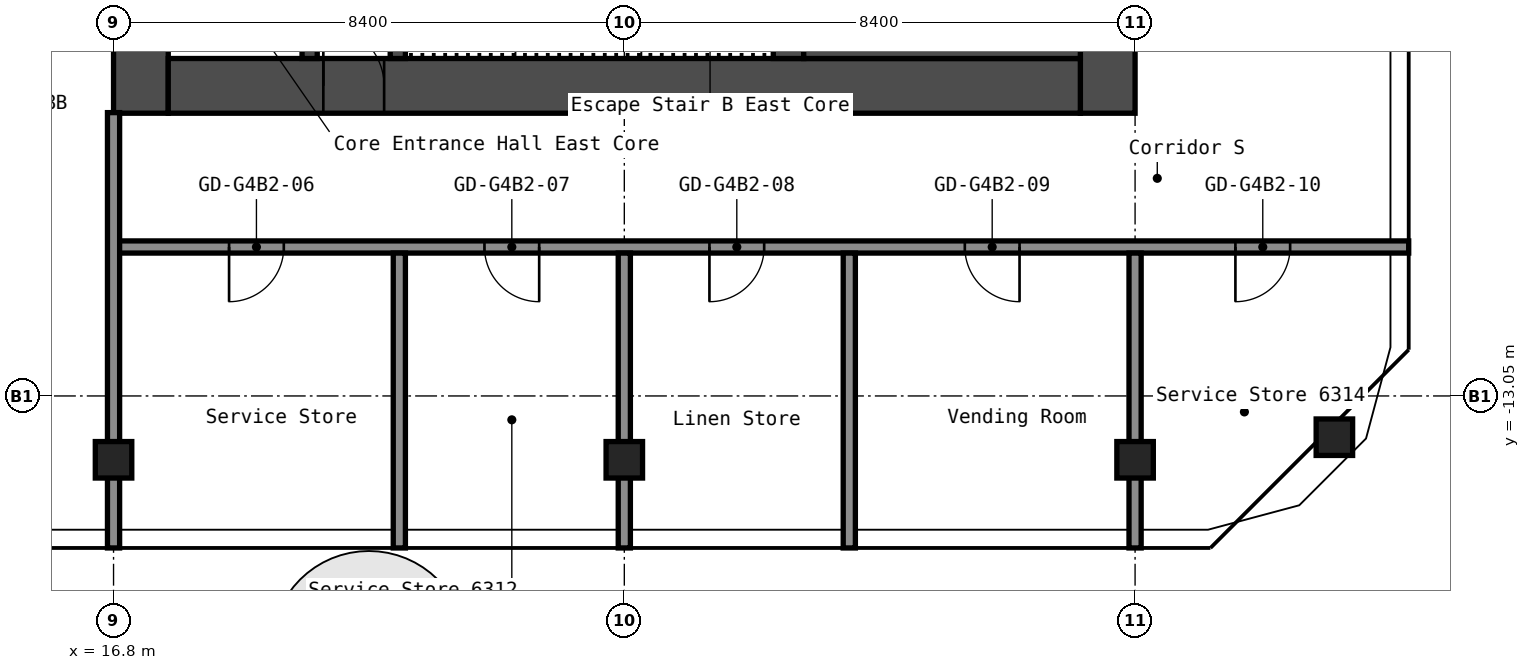
"""IFC4 building model, lengths in metres.
Left out: names, types, materials, properties, quantities, classifications, styles, units other than length and angle.
Written with IfcOpenShell. Run it as: python <this file> out.ifc"""

import sys

from ifc_helpers import new_model, si_unit, direction, frame, frame_2d, origin, origin_2d, place, context, subcontext, project, spatial, rectangle, hollow_rectangle, extrude, element, fill, save


model = new_model("IFC4")
c1 = context("Model", 3, precision=1e-05, world=origin(), true_north=direction((0.0, 1.0)))
c2 = subcontext(c1, "Body", "Model", "MODEL_VIEW")
j1 = project(units=[si_unit("LENGTHUNIT", "METRE"), si_unit("PLANEANGLEUNIT", "RADIAN")], contexts=[c1])
p1 = place(None, origin())
s1 = spatial("IfcSite", under=j1, at=p1, CompositionType="ELEMENT")
p2 = place(p1, origin())
s2 = spatial("IfcBuilding", under=s1, at=p2, CompositionType="ELEMENT")
p3 = place(p2, frame((0.0, 0.0, 221.8)))
s3 = spatial("IfcBuildingStorey", under=s2, at=p3, CompositionType="ELEMENT", Elevation=221.8)
for number, where, z_axis, x_axis in (
    (1, (16.8, -14.1, 0.0), (0.0, 0.0, 1.0), (1.0, 0.0, 0.0)),
    (2, (25.2, -14.1, 0.0), (0.0, 0.0, 1.0), (1.0, 0.0, 0.0)),
    (3, (33.6, -14.1, 0.0), (0.0, 0.0, 1.0), (1.0, 0.0, 0.0)),
    (4, (36.878, -13.729, 0.0), (0.0, 0.0, 1.0), (1.0, 0.0, 0.0)),
):
    element("IfcColumn", number, at=place(p3, frame(where, z_axis=z_axis, x_axis=x_axis)), inside=s3, PredefinedType="COLUMN", context=c2, shape_type="SweptSolid", body=[
        extrude(hollow_rectangle(XDim=0.6, YDim=0.6, WallThickness=0.025, InnerFilletRadius=0.038, OuterFilletRadius=0.062, at=origin_2d()), origin(), (0.0, 0.0, 1.0), 2.75),
    ])
p4 = place(p3, frame((17.25, -8.4, 0.0), z_axis=(0.0, 0.0, 1.0), x_axis=(0.0, 1.0, 0.0)))
e5 = element("IfcWall", 5, at=p4, inside=s3, PredefinedType="SHEAR", context=c2, shape_type="SweptSolid", body=[
    extrude(rectangle(XDim=16.8, YDim=0.9, at=frame_2d((8.4, 0.0))), origin(), (0.0, 0.0, 1.0), 2.75),
])
p5 = place(p4, frame((10.1, 0.0, 0.0)))
e6 = element("IfcOpeningElement", 6, at=p5, cuts=e5, PredefinedType="OPENING", context=c2, shape_type="SweptSolid", body=[
    extrude(rectangle(XDim=1.6, YDim=2.1, at=frame_2d((0.8, 1.05))), frame((0.0, 0.46, 0.0), z_axis=(0.0, -1.0, 0.0), x_axis=(1.0, 0.0, 0.0)), (0.0, 0.0, 1.0), 0.92),
])
p6 = place(p3, frame((33.15, -8.4, 0.0), z_axis=(0.0, 0.0, 1.0), x_axis=(0.0, 1.0, 0.0)))
e7 = element("IfcWall", 7, at=p6, inside=s3, PredefinedType="SHEAR", context=c2, shape_type="SweptSolid", body=[
    extrude(rectangle(XDim=16.8, YDim=0.9, at=frame_2d((8.4, 0.0))), origin(), (0.0, 0.0, 1.0), 2.75),
])
p7 = place(p3, frame((17.7, -7.95, 0.0), z_axis=(0.0, 0.0, 1.0), x_axis=(1.0, 0.0, 0.0)))
e8 = element("IfcWall", 8, at=p7, inside=s3, PredefinedType="SHEAR", context=c2, shape_type="SweptSolid", body=[
    extrude(rectangle(XDim=15.0, YDim=0.9, at=frame_2d((7.5, 0.0))), origin(), (0.0, 0.0, 1.0), 2.75),
])
p8 = place(p7, frame((2.55, 0.0, 0.0)))
e9 = element("IfcOpeningElement", 9, at=p8, cuts=e8, PredefinedType="OPENING", context=c2, shape_type="SweptSolid", body=[
    extrude(rectangle(XDim=1.0, YDim=2.1, at=frame_2d((0.5, 1.05))), frame((0.0, 0.46, 0.0), z_axis=(0.0, -1.0, 0.0), x_axis=(1.0, 0.0, 0.0)), (0.0, 0.0, 1.0), 0.92),
])
p9 = place(p3, frame((20.025, -7.5, 0.0), z_axis=(0.0, 0.0, 1.0), x_axis=(0.0, 1.0, 0.0)))
e10 = element("IfcWall", 10, at=p9, inside=s3, PredefinedType="SHEAR", context=c2, shape_type="SweptSolid", body=[
    extrude(rectangle(XDim=6.3, YDim=0.25, at=frame_2d((3.15, 0.0))), origin(), (0.0, 0.0, 1.0), 2.75),
])
p10 = place(p9, frame((2.4, 0.0, 0.0)))
e11 = element("IfcOpeningElement", 11, at=p10, cuts=e10, PredefinedType="OPENING", context=c2, shape_type="SweptSolid", body=[
    extrude(rectangle(XDim=1.0, YDim=2.1, at=frame_2d((0.5, 1.05))), frame((0.0, 0.135, 0.0), z_axis=(0.0, -1.0, 0.0), x_axis=(1.0, 0.0, 0.0)), (0.0, 0.0, 1.0), 0.27),
])
p11 = place(p3, frame((21.475, -7.5, 0.0), z_axis=(0.0, 0.0, 1.0), x_axis=(0.0, 1.0, 0.0)))
e12 = element("IfcWall", 12, at=p11, inside=s3, PredefinedType="SHEAR", context=c2, shape_type="SweptSolid", body=[
    extrude(rectangle(XDim=3.75, YDim=0.25, at=frame_2d((1.875, 0.0))), origin(), (0.0, 0.0, 1.0), 2.75),
])
p12 = place(p11, frame((1.3, 0.0, 0.0)))
e13 = element("IfcOpeningElement", 13, at=p12, cuts=e12, PredefinedType="OPENING", context=c2, shape_type="SweptSolid", body=[
    extrude(rectangle(XDim=1.2, YDim=2.1, at=frame_2d((0.6, 1.05))), frame((0.0, 0.135, 0.0), z_axis=(0.0, -1.0, 0.0), x_axis=(1.0, 0.0, 0.0)), (0.0, 0.0, 1.0), 0.27),
])
p13 = place(p3, frame((27.9, -7.5, 0.0), z_axis=(0.0, 0.0, 1.0), x_axis=(0.0, 1.0, 0.0)))
e14 = element("IfcWall", 14, at=p13, inside=s3, PredefinedType="SHEAR", context=c2, shape_type="SweptSolid", body=[
    extrude(rectangle(XDim=3.75, YDim=0.5, at=frame_2d((1.875, 0.0))), origin(), (0.0, 0.0, 1.0), 2.75),
])
p14 = place(p3, frame((28.15, -6.75, 0.0), z_axis=(0.0, 0.0, 1.0), x_axis=(1.0, 0.0, 0.0)))
e15 = element("IfcWall", 15, at=p14, inside=s3, PredefinedType="SHEAR", context=c2, shape_type="SweptSolid", body=[
    extrude(rectangle(XDim=4.55, YDim=1.5, at=frame_2d((2.275, 0.0))), origin(), (0.0, 0.0, 1.0), 2.75),
])
p15 = place(p3, frame((16.8, -10.6, 0.0), z_axis=(0.0, 0.0, 1.0), x_axis=(1.0, 0.0, 0.0)))
e16 = element("IfcWall", 16, at=p15, inside=s3, PredefinedType="PARTITIONING", context=c2, shape_type="SweptSolid", body=[
    extrude(rectangle(XDim=21.3, YDim=0.2, at=frame_2d((10.65, 0.0))), origin(), (0.0, 0.0, 1.0), 2.75),
])
p16 = place(p15, frame((1.9, 0.0, 0.0)))
e17 = element("IfcOpeningElement", 17, at=p16, cuts=e16, PredefinedType="OPENING", context=c2, shape_type="SweptSolid", body=[
    extrude(rectangle(XDim=0.9, YDim=2.1, at=frame_2d((0.45, 1.05))), frame((0.0, 0.11, 0.0), z_axis=(0.0, -1.0, 0.0), x_axis=(1.0, 0.0, 0.0)), (0.0, 0.0, 1.0), 0.22),
])
p17 = place(p15, frame((6.1, 0.0, 0.0)))
e18 = element("IfcOpeningElement", 18, at=p17, cuts=e16, PredefinedType="OPENING", context=c2, shape_type="SweptSolid", body=[
    extrude(rectangle(XDim=0.9, YDim=2.1, at=frame_2d((0.45, 1.05))), frame((0.0, 0.11, 0.0), z_axis=(0.0, -1.0, 0.0), x_axis=(1.0, 0.0, 0.0)), (0.0, 0.0, 1.0), 0.22),
])
p18 = place(p15, frame((9.8, 0.0, 0.0)))
e19 = element("IfcOpeningElement", 19, at=p18, cuts=e16, PredefinedType="OPENING", context=c2, shape_type="SweptSolid", body=[
    extrude(rectangle(XDim=0.9, YDim=2.1, at=frame_2d((0.45, 1.05))), frame((0.0, 0.11, 0.0), z_axis=(0.0, -1.0, 0.0), x_axis=(1.0, 0.0, 0.0)), (0.0, 0.0, 1.0), 0.22),
])
p19 = place(p15, frame((14.0, 0.0, 0.0)))
e20 = element("IfcOpeningElement", 20, at=p19, cuts=e16, PredefinedType="OPENING", context=c2, shape_type="SweptSolid", body=[
    extrude(rectangle(XDim=0.9, YDim=2.1, at=frame_2d((0.45, 1.05))), frame((0.0, 0.11, 0.0), z_axis=(0.0, -1.0, 0.0), x_axis=(1.0, 0.0, 0.0)), (0.0, 0.0, 1.0), 0.22),
])
p20 = place(p15, frame((18.45, 0.0, 0.0)))
e21 = element("IfcOpeningElement", 21, at=p20, cuts=e16, PredefinedType="OPENING", context=c2, shape_type="SweptSolid", body=[
    extrude(rectangle(XDim=0.9, YDim=2.1, at=frame_2d((0.45, 1.05))), frame((0.0, 0.11, 0.0), z_axis=(0.0, -1.0, 0.0), x_axis=(1.0, 0.0, 0.0)), (0.0, 0.0, 1.0), 0.22),
])
p21 = place(p3, frame((16.8, -15.55, 0.0), z_axis=(0.0, 0.0, 1.0), x_axis=(0.0, 1.0, 0.0)))
e22 = element("IfcWall", 22, at=p21, inside=s3, PredefinedType="PARTITIONING", context=c2, shape_type="SweptSolid", body=[
    extrude(rectangle(XDim=7.16, YDim=0.2, at=frame_2d((3.58, 0.0))), origin(), (0.0, 0.0, 1.0), 2.75),
])
for number, where, z_axis, x_axis in (
    (23, (21.5, -15.55, 0.0), (0.0, 0.0, 1.0), (0.0, 1.0, 0.0)),
    (24, (25.2, -15.55, 0.0), (0.0, 0.0, 1.0), (0.0, 1.0, 0.0)),
    (25, (28.9, -15.55, 0.0), (0.0, 0.0, 1.0), (0.0, 1.0, 0.0)),
    (26, (33.6, -15.55, 0.0), (0.0, 0.0, 1.0), (0.0, 1.0, 0.0)),
):
    element("IfcWall", number, at=place(p3, frame(where, z_axis=z_axis, x_axis=x_axis)), inside=s3, PredefinedType="PARTITIONING", context=c2, shape_type="SweptSolid", body=[
        extrude(rectangle(XDim=4.85, YDim=0.2, at=frame_2d((2.425, 0.0))), origin(), (0.0, 0.0, 1.0), 2.75),
    ])
p22 = place(p8, origin())
e27 = element("IfcDoor", 27, at=p22, inside=s3, OperationType="SINGLE_SWING_RIGHT", PredefinedType="DOOR", context=c2, shape_type="SweptSolid", body=[
    extrude(rectangle(XDim=1.0, YDim=2.1, at=frame_2d((0.5, 1.05))), frame((0.0, 0.025, 0.0), z_axis=(0.0, -1.0, 0.0), x_axis=(1.0, 0.0, 0.0)), (0.0, 0.0, 1.0), 0.05),
])
fill(e9, e27)
p23 = place(p16, origin())
e28 = element("IfcDoor", 28, at=p23, inside=s3, OperationType="SINGLE_SWING_LEFT", PredefinedType="DOOR", context=c2, shape_type="SweptSolid", body=[
    extrude(rectangle(XDim=0.9, YDim=2.1, at=frame_2d((0.45, 1.05))), frame((0.0, 0.025, 0.0), z_axis=(0.0, -1.0, 0.0), x_axis=(1.0, 0.0, 0.0)), (0.0, 0.0, 1.0), 0.05),
])
fill(e17, e28)
p24 = place(p17, origin())
e29 = element("IfcDoor", 29, at=p24, inside=s3, OperationType="SINGLE_SWING_RIGHT", PredefinedType="DOOR", context=c2, shape_type="SweptSolid", body=[
    extrude(rectangle(XDim=0.9, YDim=2.1, at=frame_2d((0.45, 1.05))), frame((0.0, 0.025, 0.0), z_axis=(0.0, -1.0, 0.0), x_axis=(1.0, 0.0, 0.0)), (0.0, 0.0, 1.0), 0.05),
])
fill(e18, e29)
p25 = place(p18, origin())
e30 = element("IfcDoor", 30, at=p25, inside=s3, OperationType="SINGLE_SWING_LEFT", PredefinedType="DOOR", context=c2, shape_type="SweptSolid", body=[
    extrude(rectangle(XDim=0.9, YDim=2.1, at=frame_2d((0.45, 1.05))), frame((0.0, 0.025, 0.0), z_axis=(0.0, -1.0, 0.0), x_axis=(1.0, 0.0, 0.0)), (0.0, 0.0, 1.0), 0.05),
])
fill(e19, e30)
p26 = place(p19, origin())
e31 = element("IfcDoor", 31, at=p26, inside=s3, OperationType="SINGLE_SWING_RIGHT", PredefinedType="DOOR", context=c2, shape_type="SweptSolid", body=[
    extrude(rectangle(XDim=0.9, YDim=2.1, at=frame_2d((0.45, 1.05))), frame((0.0, 0.025, 0.0), z_axis=(0.0, -1.0, 0.0), x_axis=(1.0, 0.0, 0.0)), (0.0, 0.0, 1.0), 0.05),
])
fill(e20, e31)
p27 = place(p20, origin())
e32 = element("IfcDoor", 32, at=p27, inside=s3, OperationType="SINGLE_SWING_LEFT", PredefinedType="DOOR", context=c2, shape_type="SweptSolid", body=[
    extrude(rectangle(XDim=0.9, YDim=2.1, at=frame_2d((0.45, 1.05))), frame((0.0, 0.025, 0.0), z_axis=(0.0, -1.0, 0.0), x_axis=(1.0, 0.0, 0.0)), (0.0, 0.0, 1.0), 0.05),
])
fill(e21, e32)
save(model, sys.argv[1])
